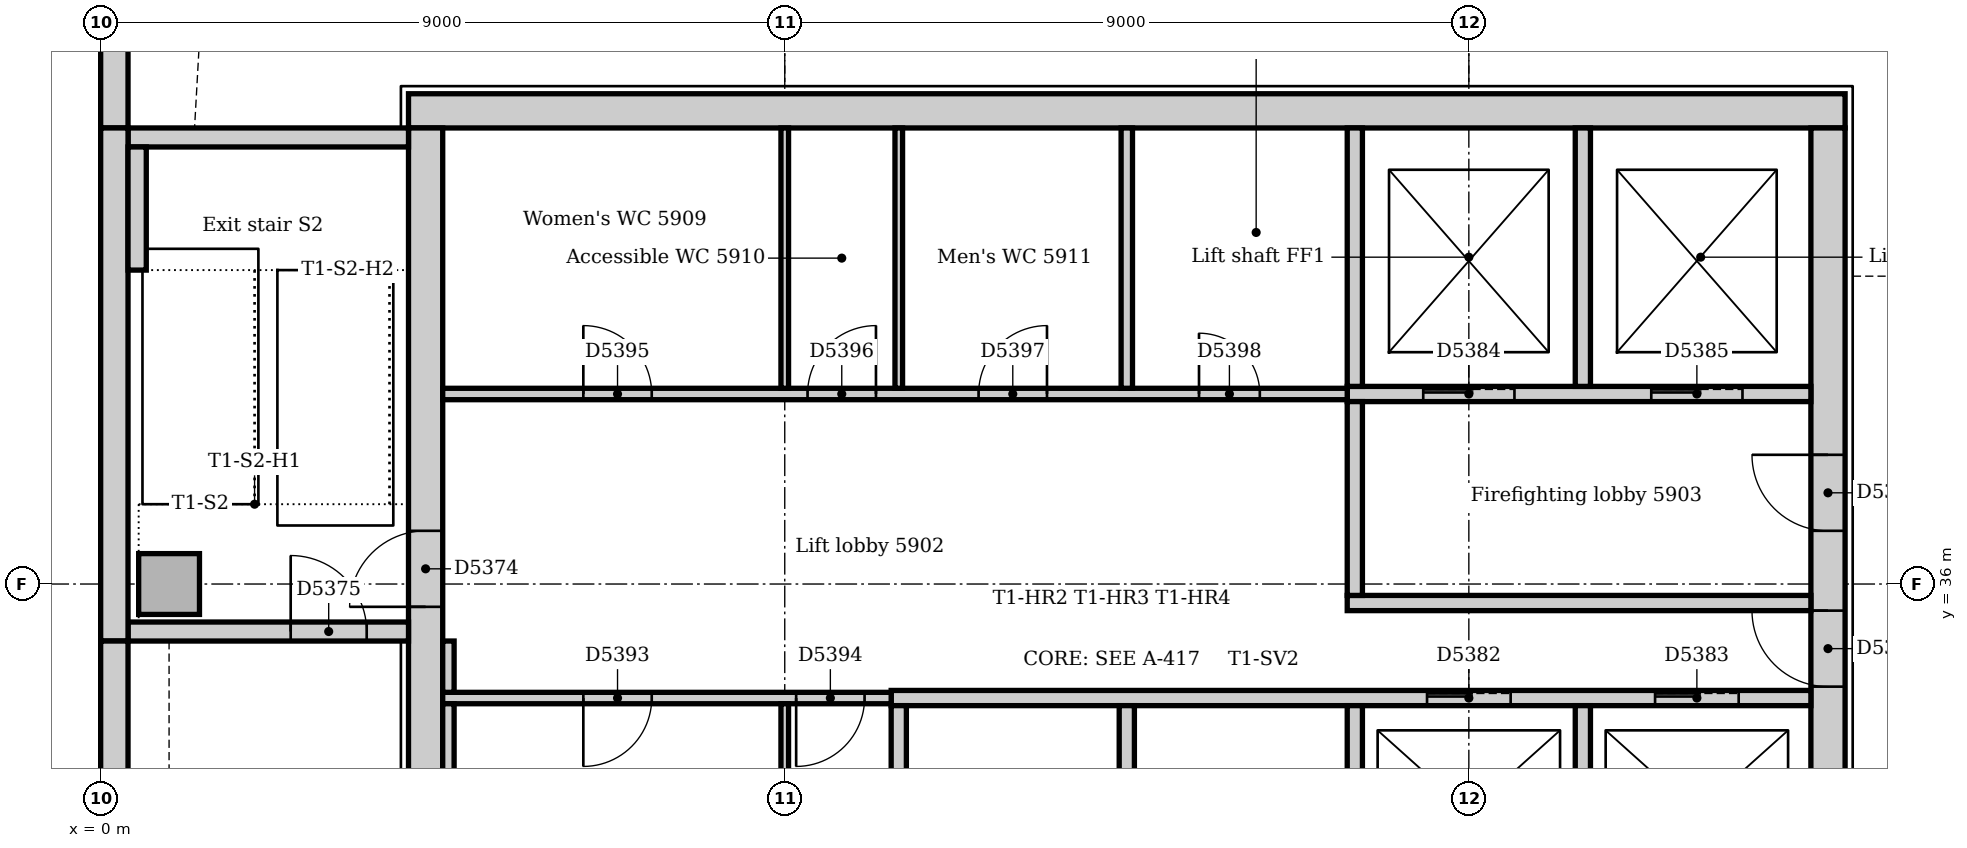
"""IFC4 building model, lengths in metres.
Left out: names, types, materials, properties, quantities, classifications, styles, units other than length and angle.
Written with IfcOpenShell. Run it as: python <this file> out.ifc"""

import sys

from ifc_helpers import new_model, si_unit, direction, frame, frame_2d, origin, origin_2d, place, context, subcontext, project, spatial, rectangle, extrude, element, fill, save


model = new_model("IFC4")
c1 = context("Model", 3, precision=1e-05, world=origin(), true_north=direction((0.0, 1.0)))
c2 = subcontext(c1, "Body", "Model", "MODEL_VIEW")
j1 = project(units=[si_unit("LENGTHUNIT", "METRE"), si_unit("PLANEANGLEUNIT", "RADIAN")], contexts=[c1])
p1 = place(None, origin())
s1 = spatial("IfcSite", under=j1, at=p1, CompositionType="ELEMENT")
p2 = place(p1, origin())
s2 = spatial("IfcBuilding", under=s1, at=p2, CompositionType="ELEMENT")
p3 = place(p2, frame((0.0, 0.0, 247.0)))
s3 = spatial("IfcBuildingStorey", under=s2, at=p3, CompositionType="ELEMENT", Elevation=247.0)
p4 = place(p3, frame((22.95, 42.225, 0.0), z_axis=(0.0, 0.0, 1.0), x_axis=(-1.0, 0.0, 0.0)))
e1 = element("IfcWall", 1, at=p4, inside=s3, PredefinedType="SOLIDWALL", context=c2, shape_type="SweptSolid", body=[
    extrude(rectangle(XDim=18.9, YDim=0.45, at=frame_2d((9.45, 0.0))), origin(), (0.0, 0.0, 1.0), 4.0),
])
p5 = place(p3, frame((22.725, 31.5, 0.0), z_axis=(0.0, 0.0, 1.0), x_axis=(0.0, 1.0, 0.0)))
e2 = element("IfcWall", 2, at=p5, inside=s3, PredefinedType="SOLIDWALL", context=c2, shape_type="SweptSolid", body=[
    extrude(rectangle(XDim=10.5, YDim=0.45, at=frame_2d((5.25, 0.0))), origin(), (0.0, 0.0, 1.0), 4.0),
])
p6 = place(p5, frame((3.15, 0.0, 0.0)))
e3 = element("IfcOpeningElement", 3, at=p6, cuts=e2, PredefinedType="OPENING", context=c2, shape_type="SweptSolid", body=[
    extrude(rectangle(XDim=1.0, YDim=2.1, at=frame_2d((0.5, 1.05))), frame((0.0, 0.235, 0.0), z_axis=(0.0, -1.0, 0.0), x_axis=(1.0, 0.0, 0.0)), (0.0, 0.0, 1.0), 0.47),
])
p7 = place(p5, frame((5.2, 0.0, 0.0)))
e4 = element("IfcOpeningElement", 4, at=p7, cuts=e2, PredefinedType="OPENING", context=c2, shape_type="SweptSolid", body=[
    extrude(rectangle(XDim=1.0, YDim=2.1, at=frame_2d((0.5, 1.05))), frame((0.0, 0.235, 0.0), z_axis=(0.0, -1.0, 0.0), x_axis=(1.0, 0.0, 0.0)), (0.0, 0.0, 1.0), 0.47),
])
p8 = place(p3, frame((4.275, 42.0, 0.0), z_axis=(0.0, 0.0, 1.0), x_axis=(0.0, -1.0, 0.0)))
e5 = element("IfcWall", 5, at=p8, inside=s3, PredefinedType="SOLIDWALL", context=c2, shape_type="SweptSolid", body=[
    extrude(rectangle(XDim=10.5, YDim=0.45, at=frame_2d((5.25, 0.0))), origin(), (0.0, 0.0, 1.0), 4.0),
])
p9 = place(p8, frame((5.3, 0.0, 0.0)))
e6 = element("IfcOpeningElement", 6, at=p9, cuts=e5, PredefinedType="OPENING", context=c2, shape_type="SweptSolid", body=[
    extrude(rectangle(XDim=1.0, YDim=2.1, at=frame_2d((0.5, 1.05))), frame((0.0, 0.235, 0.0), z_axis=(0.0, -1.0, 0.0), x_axis=(1.0, 0.0, 0.0)), (0.0, 0.0, 1.0), 0.47),
])
p10 = place(p3, frame((0.36, 35.375, 0.0), z_axis=(0.0, 0.0, 1.0), x_axis=(1.0, 0.0, 0.0)))
e7 = element("IfcWall", 7, at=p10, inside=s3, PredefinedType="SOLIDWALL", context=c2, shape_type="SweptSolid", body=[
    extrude(rectangle(XDim=3.69, YDim=0.25, at=frame_2d((1.845, 0.0))), origin(), (0.0, 0.0, 1.0), 4.0),
])
p11 = place(p10, frame((2.14, 0.0, 0.0)))
e8 = element("IfcOpeningElement", 8, at=p11, cuts=e7, PredefinedType="OPENING", context=c2, shape_type="SweptSolid", body=[
    extrude(rectangle(XDim=1.0, YDim=2.1, at=frame_2d((0.5, 1.05))), frame((0.0, 0.135, 0.0), z_axis=(0.0, -1.0, 0.0), x_axis=(1.0, 0.0, 0.0)), (0.0, 0.0, 1.0), 0.27),
])
p12 = place(p3, frame((4.05, 41.875, 0.0), z_axis=(0.0, 0.0, 1.0), x_axis=(-1.0, 0.0, 0.0)))
e9 = element("IfcWall", 9, at=p12, inside=s3, PredefinedType="SOLIDWALL", context=c2, shape_type="SweptSolid", body=[
    extrude(rectangle(XDim=3.69, YDim=0.25, at=frame_2d((1.845, 0.0))), origin(), (0.0, 0.0, 1.0), 4.0),
])
p13 = place(p3, frame((0.9, 36.0, 0.0), z_axis=(0.0, 0.0, 1.0), x_axis=(1.0, 0.0, 0.0)))
e10 = element("IfcColumn", 10, at=p13, inside=s3, PredefinedType="COLUMN", context=c2, shape_type="SweptSolid", body=[
    extrude(rectangle(XDim=0.8, YDim=0.8, at=origin_2d()), origin(), (0.0, 0.0, 1.0), 4.0),
])
p14 = place(p3, frame((0.18, 58.757, 0.0), z_axis=(0.0, 0.0, 1.0), x_axis=(0.0, -1.0, 0.0)))
e11 = element("IfcWall", 11, at=p14, inside=s3, PredefinedType="STANDARD", context=c2, shape_type="SweptSolid", body=[
    extrude(rectangle(XDim=16.757, YDim=0.36, at=frame_2d((8.379, 0.0))), origin(), (0.0, 0.0, 1.0), 3.85),
])
p15 = place(p14, frame((3.107, 0.0, 0.9)))
e12 = element("IfcOpeningElement", 12, at=p15, cuts=e11, PredefinedType="OPENING", context=c2, shape_type="SweptSolid", body=[
    extrude(rectangle(XDim=3.3, YDim=1.6, at=frame_2d((1.65, 0.8))), frame((0.0, 0.19, 0.0), z_axis=(0.0, -1.0, 0.0), x_axis=(1.0, 0.0, 0.0)), (0.0, 0.0, 1.0), 0.38),
])
p16 = place(p14, frame((7.307, 0.0, 0.9)))
e13 = element("IfcOpeningElement", 13, at=p16, cuts=e11, PredefinedType="OPENING", context=c2, shape_type="SweptSolid", body=[
    extrude(rectangle(XDim=3.3, YDim=1.6, at=frame_2d((1.65, 0.8))), frame((0.0, 0.19, 0.0), z_axis=(0.0, -1.0, 0.0), x_axis=(1.0, 0.0, 0.0)), (0.0, 0.0, 1.0), 0.38),
])
p17 = place(p14, frame((12.107, 0.0, 0.9)))
e14 = element("IfcOpeningElement", 14, at=p17, cuts=e11, PredefinedType="OPENING", context=c2, shape_type="SweptSolid", body=[
    extrude(rectangle(XDim=3.3, YDim=1.6, at=frame_2d((1.65, 0.8))), frame((0.0, 0.19, 0.0), z_axis=(0.0, -1.0, 0.0), x_axis=(1.0, 0.0, 0.0)), (0.0, 0.0, 1.0), 0.38),
])
p18 = place(p3, frame((0.18, 42.0, 0.0), z_axis=(0.0, 0.0, 1.0), x_axis=(0.0, -1.0, 0.0)))
e15 = element("IfcWall", 15, at=p18, inside=s3, PredefinedType="STANDARD", context=c2, shape_type="SweptSolid", body=[
    extrude(rectangle(XDim=6.75, YDim=0.36, at=frame_2d((3.375, 0.0))), origin(), (0.0, 0.0, 1.0), 3.85),
])
p19 = place(p3, frame((0.18, 35.25, 0.0), z_axis=(0.0, 0.0, 1.0), x_axis=(0.0, -1.0, 0.0)))
e16 = element("IfcWall", 16, at=p19, inside=s3, PredefinedType="STANDARD", context=c2, shape_type="SweptSolid", body=[
    extrude(rectangle(XDim=7.5, YDim=0.36, at=frame_2d((3.75, 0.0))), origin(), (0.0, 0.0, 1.0), 3.85),
])
p20 = place(p3, frame((0.48, 40.13, 0.0), z_axis=(0.0, 0.0, 1.0), x_axis=(0.0, 1.0, 0.0)))
e17 = element("IfcWall", 17, at=p20, inside=s3, PredefinedType="STANDARD", context=c2, shape_type="SweptSolid", body=[
    extrude(rectangle(XDim=1.62, YDim=0.24, at=frame_2d((0.81, 0.0))), origin(), (0.0, 0.0, 1.0), 4.0),
])
p21 = place(p3, frame((16.4, 35.75, 0.0), z_axis=(0.0, 0.0, 1.0), x_axis=(1.0, 0.0, 0.0)))
e18 = element("IfcWall", 18, at=p21, inside=s3, PredefinedType="PARTITIONING", context=c2, shape_type="SweptSolid", body=[
    extrude(rectangle(XDim=6.1, YDim=0.2, at=frame_2d((3.05, 0.0))), origin(), (0.0, 0.0, 1.0), 3.85),
])
p22 = place(p3, frame((16.4, 38.5, 0.0), z_axis=(0.0, 0.0, 1.0), x_axis=(1.0, 0.0, 0.0)))
e19 = element("IfcWall", 19, at=p22, inside=s3, PredefinedType="PARTITIONING", context=c2, shape_type="SweptSolid", body=[
    extrude(rectangle(XDim=6.1, YDim=0.2, at=frame_2d((3.05, 0.0))), origin(), (0.0, 0.0, 1.0), 3.85),
])
p23 = place(p22, frame((1.0, 0.0, 0.0)))
e20 = element("IfcOpeningElement", 20, at=p23, cuts=e19, PredefinedType="OPENING", context=c2, shape_type="SweptSolid", body=[
    extrude(rectangle(XDim=1.2, YDim=2.1, at=frame_2d((0.6, 1.05))), frame((0.0, 0.11, 0.0), z_axis=(0.0, -1.0, 0.0), x_axis=(1.0, 0.0, 0.0)), (0.0, 0.0, 1.0), 0.22),
])
p24 = place(p22, frame((4.0, 0.0, 0.0)))
e21 = element("IfcOpeningElement", 21, at=p24, cuts=e19, PredefinedType="OPENING", context=c2, shape_type="SweptSolid", body=[
    extrude(rectangle(XDim=1.2, YDim=2.1, at=frame_2d((0.6, 1.05))), frame((0.0, 0.11, 0.0), z_axis=(0.0, -1.0, 0.0), x_axis=(1.0, 0.0, 0.0)), (0.0, 0.0, 1.0), 0.22),
])
p25 = place(p3, frame((16.5, 35.85, 0.0), z_axis=(0.0, 0.0, 1.0), x_axis=(0.0, 1.0, 0.0)))
e22 = element("IfcWall", 22, at=p25, inside=s3, PredefinedType="PARTITIONING", context=c2, shape_type="SweptSolid", body=[
    extrude(rectangle(XDim=2.55, YDim=0.2, at=frame_2d((1.275, 0.0))), origin(), (0.0, 0.0, 1.0), 3.85),
])
p26 = place(p3, frame((10.4, 34.5, 0.0), z_axis=(0.0, 0.0, 1.0), x_axis=(1.0, 0.0, 0.0)))
e23 = element("IfcWall", 23, at=p26, inside=s3, PredefinedType="PARTITIONING", context=c2, shape_type="SweptSolid", body=[
    extrude(rectangle(XDim=12.1, YDim=0.2, at=frame_2d((6.05, 0.0))), origin(), (0.0, 0.0, 1.0), 3.85),
])
p27 = place(p26, frame((7.05, 0.0, 0.0)))
e24 = element("IfcOpeningElement", 24, at=p27, cuts=e23, PredefinedType="OPENING", context=c2, shape_type="SweptSolid", body=[
    extrude(rectangle(XDim=1.1, YDim=2.1, at=frame_2d((0.55, 1.05))), frame((0.0, 0.11, 0.0), z_axis=(0.0, -1.0, 0.0), x_axis=(1.0, 0.0, 0.0)), (0.0, 0.0, 1.0), 0.22),
])
p28 = place(p26, frame((10.05, 0.0, 0.0)))
e25 = element("IfcOpeningElement", 25, at=p28, cuts=e23, PredefinedType="OPENING", context=c2, shape_type="SweptSolid", body=[
    extrude(rectangle(XDim=1.1, YDim=2.1, at=frame_2d((0.55, 1.05))), frame((0.0, 0.11, 0.0), z_axis=(0.0, -1.0, 0.0), x_axis=(1.0, 0.0, 0.0)), (0.0, 0.0, 1.0), 0.22),
])
for number, where, z_axis, x_axis in (
    (26, (10.5, 31.75, 0.0), (0.0, 0.0, 1.0), (0.0, 1.0, 0.0)),
    (27, (13.5, 31.75, 0.0), (0.0, 0.0, 1.0), (0.0, 1.0, 0.0)),
    (28, (16.5, 31.75, 0.0), (0.0, 0.0, 1.0), (0.0, 1.0, 0.0)),
    (29, (19.5, 31.75, 0.0), (0.0, 0.0, 1.0), (0.0, 1.0, 0.0)),
):
    element("IfcWall", number, at=place(p3, frame(where, z_axis=z_axis, x_axis=x_axis)), inside=s3, PredefinedType="PARTITIONING", context=c2, shape_type="SweptSolid", body=[
        extrude(rectangle(XDim=2.65, YDim=0.2, at=frame_2d((1.325, 0.0))), origin(), (0.0, 0.0, 1.0), 3.85),
    ])
for number, where, z_axis, x_axis in (
    (30, (16.5, 38.6, 0.0), (0.0, 0.0, 1.0), (0.0, 1.0, 0.0)),
    (31, (19.5, 38.6, 0.0), (0.0, 0.0, 1.0), (0.0, 1.0, 0.0)),
):
    element("IfcWall", number, at=place(p3, frame(where, z_axis=z_axis, x_axis=x_axis)), inside=s3, PredefinedType="PARTITIONING", context=c2, shape_type="SweptSolid", body=[
        extrude(rectangle(XDim=3.4, YDim=0.2, at=frame_2d((1.7, 0.0))), origin(), (0.0, 0.0, 1.0), 3.85),
    ])
p29 = place(p3, frame((4.5, 38.5, 0.0), z_axis=(0.0, 0.0, 1.0), x_axis=(1.0, 0.0, 0.0)))
e32 = element("IfcWall", 32, at=p29, inside=s3, PredefinedType="PARTITIONING", context=c2, shape_type="SweptSolid", body=[
    extrude(rectangle(XDim=11.9, YDim=0.15, at=frame_2d((5.95, 0.0))), origin(), (0.0, 0.0, 1.0), 3.85),
])
p30 = place(p29, frame((1.85, 0.0, 0.0)))
e33 = element("IfcOpeningElement", 33, at=p30, cuts=e32, PredefinedType="OPENING", context=c2, shape_type="SweptSolid", body=[
    extrude(rectangle(XDim=0.9, YDim=2.1, at=frame_2d((0.45, 1.05))), frame((0.0, 0.085, 0.0), z_axis=(0.0, -1.0, 0.0), x_axis=(1.0, 0.0, 0.0)), (0.0, 0.0, 1.0), 0.17),
])
p31 = place(p29, frame((4.8, 0.0, 0.0)))
e34 = element("IfcOpeningElement", 34, at=p31, cuts=e32, PredefinedType="OPENING", context=c2, shape_type="SweptSolid", body=[
    extrude(rectangle(XDim=0.9, YDim=2.1, at=frame_2d((0.45, 1.05))), frame((0.0, 0.085, 0.0), z_axis=(0.0, -1.0, 0.0), x_axis=(1.0, 0.0, 0.0)), (0.0, 0.0, 1.0), 0.17),
])
p32 = place(p29, frame((7.05, 0.0, 0.0)))
e35 = element("IfcOpeningElement", 35, at=p32, cuts=e32, PredefinedType="OPENING", context=c2, shape_type="SweptSolid", body=[
    extrude(rectangle(XDim=0.9, YDim=2.1, at=frame_2d((0.45, 1.05))), frame((0.0, 0.085, 0.0), z_axis=(0.0, -1.0, 0.0), x_axis=(1.0, 0.0, 0.0)), (0.0, 0.0, 1.0), 0.17),
])
p33 = place(p29, frame((9.95, 0.0, 0.0)))
e36 = element("IfcOpeningElement", 36, at=p33, cuts=e32, PredefinedType="OPENING", context=c2, shape_type="SweptSolid", body=[
    extrude(rectangle(XDim=0.8, YDim=2.1, at=frame_2d((0.4, 1.05))), frame((0.0, 0.085, 0.0), z_axis=(0.0, -1.0, 0.0), x_axis=(1.0, 0.0, 0.0)), (0.0, 0.0, 1.0), 0.17),
])
p34 = place(p3, frame((4.5, 34.5, 0.0), z_axis=(0.0, 0.0, 1.0), x_axis=(1.0, 0.0, 0.0)))
e37 = element("IfcWall", 37, at=p34, inside=s3, PredefinedType="PARTITIONING", context=c2, shape_type="SweptSolid", body=[
    extrude(rectangle(XDim=5.9, YDim=0.15, at=frame_2d((2.95, 0.0))), origin(), (0.0, 0.0, 1.0), 3.85),
])
p35 = place(p34, frame((1.85, 0.0, 0.0)))
e38 = element("IfcOpeningElement", 38, at=p35, cuts=e37, PredefinedType="OPENING", context=c2, shape_type="SweptSolid", body=[
    extrude(rectangle(XDim=0.9, YDim=2.1, at=frame_2d((0.45, 1.05))), frame((0.0, 0.085, 0.0), z_axis=(0.0, -1.0, 0.0), x_axis=(1.0, 0.0, 0.0)), (0.0, 0.0, 1.0), 0.17),
])
p36 = place(p34, frame((4.65, 0.0, 0.0)))
e39 = element("IfcOpeningElement", 39, at=p36, cuts=e37, PredefinedType="OPENING", context=c2, shape_type="SweptSolid", body=[
    extrude(rectangle(XDim=0.9, YDim=2.1, at=frame_2d((0.45, 1.05))), frame((0.0, 0.085, 0.0), z_axis=(0.0, -1.0, 0.0), x_axis=(1.0, 0.0, 0.0)), (0.0, 0.0, 1.0), 0.17),
])
p37 = place(p3, frame((4.575, 34.575, 0.0), z_axis=(0.0, 0.0, 1.0), x_axis=(0.0, 1.0, 0.0)))
e40 = element("IfcWall", 40, at=p37, inside=s3, PredefinedType="PARTITIONING", context=c2, shape_type="SweptSolid", body=[
    extrude(rectangle(XDim=0.675, YDim=0.15, at=frame_2d((0.338, 0.0))), origin(), (0.0, 0.0, 1.0), 3.85),
])
p38 = place(p3, frame((4.575, 31.75, 0.0), z_axis=(0.0, 0.0, 1.0), x_axis=(0.0, 1.0, 0.0)))
e41 = element("IfcWall", 41, at=p38, inside=s3, PredefinedType="PARTITIONING", context=c2, shape_type="SweptSolid", body=[
    extrude(rectangle(XDim=2.675, YDim=0.15, at=frame_2d((1.337, 0.0))), origin(), (0.0, 0.0, 1.0), 3.85),
])
p39 = place(p3, frame((13.5, 38.575, 0.0), z_axis=(0.0, 0.0, 1.0), x_axis=(0.0, 1.0, 0.0)))
e42 = element("IfcWall", 42, at=p39, inside=s3, PredefinedType="PARTITIONING", context=c2, shape_type="SweptSolid", body=[
    extrude(rectangle(XDim=3.425, YDim=0.15, at=frame_2d((1.712, 0.0))), origin(), (0.0, 0.0, 1.0), 3.85),
])
for number, where, z_axis, x_axis in (
    (43, (9.0, 38.575, 0.0), (0.0, 0.0, 1.0), (0.0, 1.0, 0.0)),
    (44, (10.5, 38.575, 0.0), (0.0, 0.0, 1.0), (0.0, 1.0, 0.0)),
):
    element("IfcWall", number, at=place(p3, frame(where, z_axis=z_axis, x_axis=x_axis)), inside=s3, PredefinedType="PARTITIONING", context=c2, shape_type="SweptSolid", body=[
        extrude(rectangle(XDim=3.425, YDim=0.1, at=frame_2d((1.712, 0.0))), origin(), (0.0, 0.0, 1.0), 3.85),
    ])
p40 = place(p3, frame((9.0, 31.75, 0.0), z_axis=(0.0, 0.0, 1.0), x_axis=(0.0, 1.0, 0.0)))
e45 = element("IfcWall", 45, at=p40, inside=s3, PredefinedType="PARTITIONING", context=c2, shape_type="SweptSolid", body=[
    extrude(rectangle(XDim=2.675, YDim=0.1, at=frame_2d((1.337, 0.0))), origin(), (0.0, 0.0, 1.0), 3.85),
])
p41 = place(p9, frame((1.0, 0.0, 0.0), z_axis=(0.0, 0.0, 1.0), x_axis=(-1.0, 0.0, 0.0)))
e46 = element("IfcDoor", 46, at=p41, inside=s3, OperationType="SINGLE_SWING_LEFT", PredefinedType="DOOR", context=c2, shape_type="SweptSolid", body=[
    extrude(rectangle(XDim=1.0, YDim=2.1, at=frame_2d((0.5, 1.05))), frame((0.0, 0.025, 0.0), z_axis=(0.0, -1.0, 0.0), x_axis=(1.0, 0.0, 0.0)), (0.0, 0.0, 1.0), 0.05),
])
fill(e6, e46)
p42 = place(p11, origin())
e47 = element("IfcDoor", 47, at=p42, inside=s3, OperationType="SINGLE_SWING_LEFT", PredefinedType="DOOR", context=c2, shape_type="SweptSolid", body=[
    extrude(rectangle(XDim=1.0, YDim=2.1, at=frame_2d((0.5, 1.05))), frame((0.0, 0.025, 0.0), z_axis=(0.0, -1.0, 0.0), x_axis=(1.0, 0.0, 0.0)), (0.0, 0.0, 1.0), 0.05),
])
fill(e8, e47)
p43 = place(p27, origin())
e48 = element("IfcDoor", 48, at=p43, inside=s3, OperationType="SLIDING_TO_LEFT", PredefinedType="DOOR", context=c2, shape_type="SweptSolid", body=[
    extrude(rectangle(XDim=1.1, YDim=2.1, at=frame_2d((0.55, 1.05))), frame((0.0, 0.025, 0.0), z_axis=(0.0, -1.0, 0.0), x_axis=(1.0, 0.0, 0.0)), (0.0, 0.0, 1.0), 0.05),
])
fill(e24, e48)
p44 = place(p28, origin())
e49 = element("IfcDoor", 49, at=p44, inside=s3, OperationType="SLIDING_TO_LEFT", PredefinedType="DOOR", context=c2, shape_type="SweptSolid", body=[
    extrude(rectangle(XDim=1.1, YDim=2.1, at=frame_2d((0.55, 1.05))), frame((0.0, 0.025, 0.0), z_axis=(0.0, -1.0, 0.0), x_axis=(1.0, 0.0, 0.0)), (0.0, 0.0, 1.0), 0.05),
])
fill(e25, e49)
p45 = place(p23, origin())
e50 = element("IfcDoor", 50, at=p45, inside=s3, OperationType="SLIDING_TO_LEFT", PredefinedType="DOOR", context=c2, shape_type="SweptSolid", body=[
    extrude(rectangle(XDim=1.2, YDim=2.1, at=frame_2d((0.6, 1.05))), frame((0.0, 0.025, 0.0), z_axis=(0.0, -1.0, 0.0), x_axis=(1.0, 0.0, 0.0)), (0.0, 0.0, 1.0), 0.05),
])
fill(e20, e50)
p46 = place(p24, origin())
e51 = element("IfcDoor", 51, at=p46, inside=s3, OperationType="SLIDING_TO_LEFT", PredefinedType="DOOR", context=c2, shape_type="SweptSolid", body=[
    extrude(rectangle(XDim=1.2, YDim=2.1, at=frame_2d((0.6, 1.05))), frame((0.0, 0.025, 0.0), z_axis=(0.0, -1.0, 0.0), x_axis=(1.0, 0.0, 0.0)), (0.0, 0.0, 1.0), 0.05),
])
fill(e21, e51)
p47 = place(p6, origin())
e52 = element("IfcDoor", 52, at=p47, inside=s3, OperationType="SINGLE_SWING_RIGHT", PredefinedType="DOOR", context=c2, shape_type="SweptSolid", body=[
    extrude(rectangle(XDim=1.0, YDim=2.1, at=frame_2d((0.5, 1.05))), frame((0.0, 0.025, 0.0), z_axis=(0.0, -1.0, 0.0), x_axis=(1.0, 0.0, 0.0)), (0.0, 0.0, 1.0), 0.05),
])
fill(e3, e52)
p48 = place(p7, origin())
e53 = element("IfcDoor", 53, at=p48, inside=s3, OperationType="SINGLE_SWING_RIGHT", PredefinedType="DOOR", context=c2, shape_type="SweptSolid", body=[
    extrude(rectangle(XDim=1.0, YDim=2.1, at=frame_2d((0.5, 1.05))), frame((0.0, 0.025, 0.0), z_axis=(0.0, -1.0, 0.0), x_axis=(1.0, 0.0, 0.0)), (0.0, 0.0, 1.0), 0.05),
])
fill(e4, e53)
p49 = place(p35, frame((0.9, 0.0, 0.0), z_axis=(0.0, 0.0, 1.0), x_axis=(-1.0, 0.0, 0.0)))
e54 = element("IfcDoor", 54, at=p49, inside=s3, OperationType="SINGLE_SWING_RIGHT", PredefinedType="DOOR", context=c2, shape_type="SweptSolid", body=[
    extrude(rectangle(XDim=0.9, YDim=2.1, at=frame_2d((0.45, 1.05))), frame((0.0, 0.025, 0.0), z_axis=(0.0, -1.0, 0.0), x_axis=(1.0, 0.0, 0.0)), (0.0, 0.0, 1.0), 0.05),
])
fill(e38, e54)
p50 = place(p36, frame((0.9, 0.0, 0.0), z_axis=(0.0, 0.0, 1.0), x_axis=(-1.0, 0.0, 0.0)))
e55 = element("IfcDoor", 55, at=p50, inside=s3, OperationType="SINGLE_SWING_RIGHT", PredefinedType="DOOR", context=c2, shape_type="SweptSolid", body=[
    extrude(rectangle(XDim=0.9, YDim=2.1, at=frame_2d((0.45, 1.05))), frame((0.0, 0.025, 0.0), z_axis=(0.0, -1.0, 0.0), x_axis=(1.0, 0.0, 0.0)), (0.0, 0.0, 1.0), 0.05),
])
fill(e39, e55)
p51 = place(p30, origin())
e56 = element("IfcDoor", 56, at=p51, inside=s3, OperationType="SINGLE_SWING_LEFT", PredefinedType="DOOR", context=c2, shape_type="SweptSolid", body=[
    extrude(rectangle(XDim=0.9, YDim=2.1, at=frame_2d((0.45, 1.05))), frame((0.0, 0.025, 0.0), z_axis=(0.0, -1.0, 0.0), x_axis=(1.0, 0.0, 0.0)), (0.0, 0.0, 1.0), 0.05),
])
fill(e33, e56)
p52 = place(p31, origin())
e57 = element("IfcDoor", 57, at=p52, inside=s3, OperationType="SINGLE_SWING_RIGHT", PredefinedType="DOOR", context=c2, shape_type="SweptSolid", body=[
    extrude(rectangle(XDim=0.9, YDim=2.1, at=frame_2d((0.45, 1.05))), frame((0.0, 0.025, 0.0), z_axis=(0.0, -1.0, 0.0), x_axis=(1.0, 0.0, 0.0)), (0.0, 0.0, 1.0), 0.05),
])
fill(e34, e57)
p53 = place(p32, origin())
e58 = element("IfcDoor", 58, at=p53, inside=s3, OperationType="SINGLE_SWING_RIGHT", PredefinedType="DOOR", context=c2, shape_type="SweptSolid", body=[
    extrude(rectangle(XDim=0.9, YDim=2.1, at=frame_2d((0.45, 1.05))), frame((0.0, 0.025, 0.0), z_axis=(0.0, -1.0, 0.0), x_axis=(1.0, 0.0, 0.0)), (0.0, 0.0, 1.0), 0.05),
])
fill(e35, e58)
p54 = place(p33, origin())
e59 = element("IfcDoor", 59, at=p54, inside=s3, OperationType="SINGLE_SWING_LEFT", PredefinedType="DOOR", context=c2, shape_type="SweptSolid", body=[
    extrude(rectangle(XDim=0.8, YDim=2.1, at=frame_2d((0.4, 1.05))), frame((0.0, 0.025, 0.0), z_axis=(0.0, -1.0, 0.0), x_axis=(1.0, 0.0, 0.0)), (0.0, 0.0, 1.0), 0.05),
])
fill(e36, e59)
save(model, sys.argv[1])
